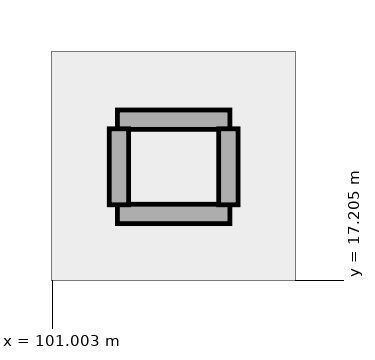
"""IFC4 building model, lengths in metres.
Left out: names, types, materials, properties, quantities, classifications, styles, units other than length and angle.
Written with IfcOpenShell. Run it as: python <this file> out.ifc"""

import sys

from ifc_helpers import new_model, si_unit, direction, frame, frame_2d, origin, place, context, subcontext, project, spatial, rectangle, extrude, element, save


model = new_model("IFC4")
c1 = context("Model", 3, precision=1e-05, world=origin(), true_north=direction((0.0, 1.0)))
c2 = subcontext(c1, "Body", "Model", "MODEL_VIEW")
j1 = project(units=[si_unit("LENGTHUNIT", "METRE"), si_unit("PLANEANGLEUNIT", "RADIAN")], contexts=[c1])
p1 = place(None, origin())
s1 = spatial("IfcSite", under=j1, at=p1, CompositionType="ELEMENT")
p2 = place(p1, origin())
s2 = spatial("IfcBuilding", under=s1, at=p2, CompositionType="ELEMENT")
p3 = place(p2, frame((0.0, 0.0, 15.6)))
s3 = spatial("IfcBuildingStorey", under=s2, at=p3, CompositionType="ELEMENT", Elevation=15.6)
for number, where, z_axis, x_axis in (
    (1, (101.86, 19.32, 0.0), (0.0, 0.0, 1.0), (1.0, 0.0, 0.0)),
    (2, (101.86, 18.08, 0.0), (0.0, 0.0, 1.0), (1.0, 0.0, 0.0)),
):
    element("IfcWall", number, at=place(p3, frame(where, z_axis=z_axis, x_axis=x_axis)), inside=s3, PredefinedType="PARTITIONING", context=c2, shape_type="SweptSolid", body=[
        extrude(rectangle(XDim=1.48, YDim=0.255, at=frame_2d((0.74, 0.0))), origin(), (0.0, 0.0, 1.0), 4.72),
    ])
for number, where, z_axis, x_axis in (
    (3, (101.88, 18.2, 0.0), (0.0, 0.0, 1.0), (0.0, 1.0, 0.0)),
    (4, (103.32, 18.2, 0.0), (0.0, 0.0, 1.0), (0.0, 1.0, 0.0)),
):
    element("IfcWall", number, at=place(p3, frame(where, z_axis=z_axis, x_axis=x_axis)), inside=s3, PredefinedType="PARTITIONING", context=c2, shape_type="SweptSolid", body=[
        extrude(rectangle(XDim=1.0, YDim=0.255, at=frame_2d((0.5, 0.0))), origin(), (0.0, 0.0, 1.0), 4.72),
    ])
save(model, sys.argv[1])
